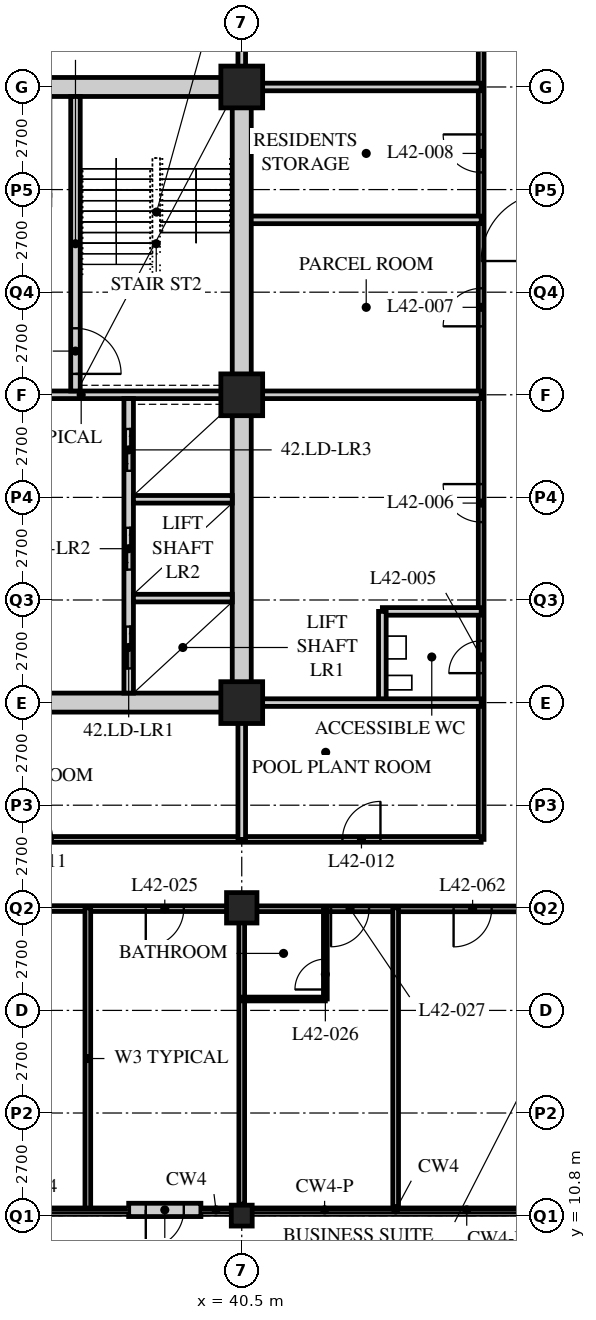
"""IFC4 building model, lengths in metres.
Left out: names, types, materials, properties, quantities, classifications, styles, units other than length and angle.
Written with IfcOpenShell. Run it as: python <this file> out.ifc"""

import sys

from ifc_helpers import new_model, si_unit, direction, frame, frame_2d, origin, origin_2d, place, context, subcontext, project, spatial, rectangle, hollow_rectangle, extrude, element, fill, save


model = new_model("IFC4")
c1 = context("Model", 3, precision=1e-05, world=origin(), true_north=direction((0.0, 1.0)))
c2 = subcontext(c1, "Body", "Model", "MODEL_VIEW")
j1 = project(units=[si_unit("LENGTHUNIT", "METRE"), si_unit("PLANEANGLEUNIT", "RADIAN")], contexts=[c1])
p1 = place(None, origin())
s1 = spatial("IfcSite", under=j1, at=p1, CompositionType="ELEMENT")
p2 = place(p1, origin())
s2 = spatial("IfcBuilding", under=s1, at=p2, CompositionType="ELEMENT")
p3 = place(p2, frame((0.0, 0.0, 165.0)))
s3 = spatial("IfcBuildingStorey", under=s2, at=p3, CompositionType="ELEMENT", Elevation=165.0)
p4 = place(p3, frame((40.5, 10.8, 0.0), z_axis=(0.0, 0.0, 1.0), x_axis=(1.0, 0.0, 0.0)))
e1 = element("IfcColumn", 1, at=p4, inside=s3, PredefinedType="COLUMN", context=c2, shape_type="SweptSolid", body=[
    extrude(hollow_rectangle(XDim=0.55, YDim=0.55, WallThickness=0.04, at=origin_2d()), origin(), (0.0, 0.0, 1.0), 5.4),
])
p5 = place(p3, frame((40.5, 18.9, 0.0), z_axis=(0.0, 0.0, 1.0), x_axis=(1.0, 0.0, 0.0)))
e2 = element("IfcColumn", 2, at=p5, inside=s3, PredefinedType="COLUMN", context=c2, shape_type="SweptSolid", body=[
    extrude(hollow_rectangle(XDim=0.8, YDim=0.8, WallThickness=0.08, at=origin_2d()), origin(), (0.0, 0.0, 1.0), 5.4),
])
for number, where, z_axis, x_axis in (
    (3, (40.5, 24.3, 0.0), (0.0, 0.0, 1.0), (1.0, 0.0, 0.0)),
    (4, (40.5, 32.4, 0.0), (0.0, 0.0, 1.0), (1.0, 0.0, 0.0)),
    (5, (40.5, 40.5, 0.0), (0.0, 0.0, 1.0), (1.0, 0.0, 0.0)),
):
    element("IfcColumn", number, at=place(p3, frame(where, z_axis=z_axis, x_axis=x_axis)), inside=s3, PredefinedType="COLUMN", context=c2, shape_type="SweptSolid", body=[
        extrude(hollow_rectangle(XDim=1.1, YDim=1.1, WallThickness=0.1, at=origin_2d()), origin(), (0.0, 0.0, 1.0), 5.4),
    ])
p6 = place(p3, frame((37.525, 10.95, 0.0), z_axis=(0.0, 0.0, 1.0), x_axis=(1.0, 0.0, 0.0)))
e6 = element("IfcWall", 6, at=p6, inside=s3, PredefinedType="SOLIDWALL", context=c2, shape_type="SweptSolid", body=[
    extrude(rectangle(XDim=1.9, YDim=0.35, at=frame_2d((0.95, 0.0))), origin(), (0.0, 0.0, 1.0), 4.42),
])
p7 = place(p6, frame((0.45, 0.0, 0.0)))
e7 = element("IfcOpeningElement", 7, at=p7, cuts=e6, PredefinedType="OPENING", context=c2, shape_type="SweptSolid", body=[
    extrude(rectangle(XDim=1.0, YDim=2.1, at=frame_2d((0.5, 1.05))), frame((0.0, 0.185, 0.0), z_axis=(0.0, -1.0, 0.0), x_axis=(1.0, 0.0, 0.0)), (0.0, 0.0, 1.0), 0.37),
])
p8 = place(p3, frame((8.1, 18.9, 0.0), z_axis=(0.0, 0.0, 1.0), x_axis=(0.999999729567, -0.000735435758, 0.0)))
e8 = element("IfcWall", 8, at=p8, inside=s3, PredefinedType="PARTITIONING", context=c2, shape_type="SweptSolid", body=[
    extrude(rectangle(XDim=40.5, YDim=0.15, at=frame_2d((20.25, 0.0))), origin(), (0.0, 0.0, 1.0), 4.42),
])
p9 = place(p8, frame((4.45, 0.0, 0.0)))
e9 = element("IfcOpeningElement", 9, at=p9, cuts=e8, PredefinedType="OPENING", context=c2, shape_type="SweptSolid", body=[
    extrude(rectangle(XDim=1.0, YDim=2.1, at=frame_2d((0.5, 1.05))), frame((0.0, 0.085, 0.0), z_axis=(0.0, -1.0, 0.0), x_axis=(1.0, 0.0, 0.0)), (0.0, 0.0, 1.0), 0.17),
])
p10 = place(p8, frame((25.15, 0.0, 0.0)))
e10 = element("IfcOpeningElement", 10, at=p10, cuts=e8, PredefinedType="OPENING", context=c2, shape_type="SweptSolid", body=[
    extrude(rectangle(XDim=1.8, YDim=2.4, at=frame_2d((0.9, 1.2))), frame((0.0, 0.085, 0.0), z_axis=(0.0, -1.0, 0.0), x_axis=(1.0, 0.0, 0.0)), (0.0, 0.0, 1.0), 0.17),
])
p11 = place(p8, frame((29.875, 0.0, 0.0)))
e11 = element("IfcOpeningElement", 11, at=p11, cuts=e8, PredefinedType="OPENING", context=c2, shape_type="SweptSolid", body=[
    extrude(rectangle(XDim=1.0, YDim=2.1, at=frame_2d((0.5, 1.05))), frame((0.0, 0.085, 0.0), z_axis=(0.0, -1.0, 0.0), x_axis=(1.0, 0.0, 0.0)), (0.0, 0.0, 1.0), 0.17),
])
p12 = place(p8, frame((34.75, 0.0, 0.0)))
e12 = element("IfcOpeningElement", 12, at=p12, cuts=e8, PredefinedType="OPENING", context=c2, shape_type="SweptSolid", body=[
    extrude(rectangle(XDim=1.0, YDim=2.1, at=frame_2d((0.5, 1.05))), frame((0.0, 0.085, 0.0), z_axis=(0.0, -1.0, 0.0), x_axis=(1.0, 0.0, 0.0)), (0.0, 0.0, 1.0), 0.17),
])
p13 = place(p8, frame((1.525, 0.0, 0.0)))
e13 = element("IfcOpeningElement", 13, at=p13, cuts=e8, PredefinedType="OPENING", context=c2, shape_type="SweptSolid", body=[
    extrude(rectangle(XDim=1.0, YDim=2.1, at=frame_2d((0.5, 1.05))), frame((0.0, 0.085, 0.0), z_axis=(0.0, -1.0, 0.0), x_axis=(1.0, 0.0, 0.0)), (0.0, 0.0, 1.0), 0.17),
])
p14 = place(p8, frame((37.975, 0.0, 0.0)))
e14 = element("IfcOpeningElement", 14, at=p14, cuts=e8, PredefinedType="OPENING", context=c2, shape_type="SweptSolid", body=[
    extrude(rectangle(XDim=1.0, YDim=2.1, at=frame_2d((0.5, 1.05))), frame((0.0, 0.085, 0.0), z_axis=(0.0, -1.0, 0.0), x_axis=(1.0, 0.0, 0.0)), (0.0, 0.0, 1.0), 0.17),
])
p15 = place(p3, frame((46.8, 20.7, 0.0), z_axis=(0.0, 0.0, 1.0), x_axis=(0.0, 1.0, 0.0)))
e15 = element("IfcWall", 15, at=p15, inside=s3, PredefinedType="PARTITIONING", context=c2, shape_type="SweptSolid", body=[
    extrude(rectangle(XDim=28.8, YDim=0.15, at=frame_2d((14.4, 0.0))), origin(), (0.0, 0.0, 1.0), 5.19),
])
p16 = place(p15, frame((4.375, 0.0, 0.0)))
e16 = element("IfcOpeningElement", 16, at=p16, cuts=e15, PredefinedType="OPENING", context=c2, shape_type="SweptSolid", body=[
    extrude(rectangle(XDim=0.85, YDim=2.1, at=frame_2d((0.425, 1.05))), frame((0.0, 0.085, 0.0), z_axis=(0.0, -1.0, 0.0), x_axis=(1.0, 0.0, 0.0)), (0.0, 0.0, 1.0), 0.17),
])
p17 = place(p15, frame((8.35, 0.0, 0.0)))
e17 = element("IfcOpeningElement", 17, at=p17, cuts=e15, PredefinedType="OPENING", context=c2, shape_type="SweptSolid", body=[
    extrude(rectangle(XDim=1.0, YDim=2.1, at=frame_2d((0.5, 1.05))), frame((0.0, 0.085, 0.0), z_axis=(0.0, -1.0, 0.0), x_axis=(1.0, 0.0, 0.0)), (0.0, 0.0, 1.0), 0.17),
])
p18 = place(p15, frame((13.502, 0.0, 0.0)))
e18 = element("IfcOpeningElement", 18, at=p18, cuts=e15, PredefinedType="OPENING", context=c2, shape_type="SweptSolid", body=[
    extrude(rectangle(XDim=1.0, YDim=2.1, at=frame_2d((0.5, 1.05))), frame((0.0, 0.085, 0.0), z_axis=(0.0, -1.0, 0.0), x_axis=(1.0, 0.0, 0.0)), (0.0, 0.0, 1.0), 0.17),
])
p19 = place(p15, frame((17.552, 0.0, 0.0)))
e19 = element("IfcOpeningElement", 19, at=p19, cuts=e15, PredefinedType="OPENING", context=c2, shape_type="SweptSolid", body=[
    extrude(rectangle(XDim=1.0, YDim=2.1, at=frame_2d((0.5, 1.05))), frame((0.0, 0.085, 0.0), z_axis=(0.0, -1.0, 0.0), x_axis=(1.0, 0.0, 0.0)), (0.0, 0.0, 1.0), 0.17),
])
p20 = place(p3, frame((29.56, 20.7, 0.0), z_axis=(0.0, 0.0, 1.0), x_axis=(1.0, 0.0, 0.0)))
e20 = element("IfcWall", 20, at=p20, inside=s3, PredefinedType="PARTITIONING", context=c2, shape_type="SweptSolid", body=[
    extrude(rectangle(XDim=17.24, YDim=0.15, at=frame_2d((8.62, 0.0))), origin(), (0.0, 0.0, 1.0), 5.19),
])
p21 = place(p20, frame((4.965, 0.0, 0.0)))
e21 = element("IfcOpeningElement", 21, at=p21, cuts=e20, PredefinedType="OPENING", context=c2, shape_type="SweptSolid", body=[
    extrude(rectangle(XDim=1.0, YDim=2.1, at=frame_2d((0.5, 1.05))), frame((0.0, 0.085, 0.0), z_axis=(0.0, -1.0, 0.0), x_axis=(1.0, 0.0, 0.0)), (0.0, 0.0, 1.0), 0.17),
])
p22 = place(p20, frame((13.59, 0.0, 0.0)))
e22 = element("IfcOpeningElement", 22, at=p22, cuts=e20, PredefinedType="OPENING", context=c2, shape_type="SweptSolid", body=[
    extrude(rectangle(XDim=1.0, YDim=2.1, at=frame_2d((0.5, 1.05))), frame((0.0, 0.085, 0.0), z_axis=(0.0, -1.0, 0.0), x_axis=(1.0, 0.0, 0.0)), (0.0, 0.0, 1.0), 0.17),
])
p23 = place(p3, frame((40.5, 32.4, 0.0), z_axis=(0.0, 0.0, 1.0), x_axis=(1.0, 0.0, 0.0)))
e23 = element("IfcWall", 23, at=p23, inside=s3, PredefinedType="SOLIDWALL", context=c2, shape_type="SweptSolid", body=[
    extrude(rectangle(XDim=6.3, YDim=0.2, at=frame_2d((3.15, 0.0))), origin(), (0.0, 0.0, 1.0), 5.19),
])
p24 = place(p3, frame((46.8, 26.7, 0.0), z_axis=(0.0, 0.0, 1.0), x_axis=(-1.0, 0.0, 0.0)))
e24 = element("IfcWall", 24, at=p24, inside=s3, PredefinedType="SOLIDWALL", context=c2, shape_type="SweptSolid", body=[
    extrude(rectangle(XDim=2.6, YDim=0.2, at=frame_2d((1.3, 0.0))), origin(), (0.0, 0.0, 1.0), 5.19),
])
p25 = place(p3, frame((44.2, 24.3, 0.0), z_axis=(0.0, 0.0, 1.0), x_axis=(0.0, 1.0, 0.0)))
e25 = element("IfcWall", 25, at=p25, inside=s3, PredefinedType="SOLIDWALL", context=c2, shape_type="SweptSolid", body=[
    extrude(rectangle(XDim=2.4, YDim=0.2, at=frame_2d((1.2, 0.0))), origin(), (0.0, 0.0, 1.0), 5.19),
])
p26 = place(p3, frame((46.8, 37.003, 0.0), z_axis=(0.0, 0.0, 1.0), x_axis=(-1.0, 0.0, 0.0)))
e26 = element("IfcWall", 26, at=p26, inside=s3, PredefinedType="SOLIDWALL", context=c2, shape_type="SweptSolid", body=[
    extrude(rectangle(XDim=6.3, YDim=0.2, at=frame_2d((3.15, 0.0))), origin(), (0.0, 0.0, 1.0), 5.19),
])
p27 = place(p3, frame((40.5, 20.7, 0.0), z_axis=(0.0, 0.0, 1.0), x_axis=(0.0, 1.0, 0.0)))
e27 = element("IfcWall", 27, at=p27, inside=s3, PredefinedType="SOLIDWALL", context=c2, shape_type="SweptSolid", body=[
    extrude(rectangle(XDim=3.6, YDim=0.2, at=frame_2d((1.8, 0.0))), origin(), (0.0, 0.0, 1.0), 4.42),
])
p28 = place(p3, frame((40.5, 40.5, 0.0), z_axis=(0.0, 0.0, 1.0), x_axis=(0.0, 1.0, 0.0)))
e28 = element("IfcWall", 28, at=p28, inside=s3, PredefinedType="SOLIDWALL", context=c2, shape_type="SweptSolid", body=[
    extrude(rectangle(XDim=9.0, YDim=0.2, at=frame_2d((4.5, 0.0))), origin(), (0.0, 0.0, 1.0), 4.42),
])
for number, where, z_axis, x_axis in (
    (29, (40.5, 24.3, 0.0), (0.0, 0.0, 1.0), (1.0, 0.0, 0.0)),
    (30, (40.5, 40.5, 0.0), (0.0, 0.0, 1.0), (1.0, 0.0, 0.0)),
):
    element("IfcWall", number, at=place(p3, frame(where, z_axis=z_axis, x_axis=x_axis)), inside=s3, PredefinedType="SOLIDWALL", context=c2, shape_type="SweptSolid", body=[
        extrude(rectangle(XDim=6.3, YDim=0.2, at=frame_2d((3.15, 0.0))), origin(), (0.0, 0.0, 1.0), 5.19),
    ])
p29 = place(p3, frame((36.45, 18.9, 0.0), z_axis=(0.0, 0.0, 1.0), x_axis=(0.0, -1.0, 0.0)))
e31 = element("IfcWall", 31, at=p29, inside=s3, PredefinedType="PARTITIONING", context=c2, shape_type="SweptSolid", body=[
    extrude(rectangle(XDim=7.933, YDim=0.15, at=frame_2d((3.966, 0.0))), origin(), (0.0, 0.0, 1.0), 5.19),
])
p30 = place(p3, frame((40.5, 18.9, 0.0), z_axis=(0.0, 0.0, 1.0), x_axis=(0.0, -1.0, 0.0)))
e32 = element("IfcWall", 32, at=p30, inside=s3, PredefinedType="PARTITIONING", context=c2, shape_type="SweptSolid", body=[
    extrude(rectangle(XDim=7.8, YDim=0.15, at=frame_2d((3.9, 0.0))), origin(), (0.0, 0.0, 1.0), 4.42),
])
p31 = place(p3, frame((40.5, 16.5, 0.0), z_axis=(0.0, 0.0, 1.0), x_axis=(1.0, 0.0, 0.0)))
e33 = element("IfcWall", 33, at=p31, inside=s3, PredefinedType="PARTITIONING", context=c2, shape_type="SweptSolid", body=[
    extrude(rectangle(XDim=2.2, YDim=0.1, at=frame_2d((1.1, 0.0))), origin(), (0.0, 0.0, 1.0), 5.19),
])
p32 = place(p3, frame((42.7, 18.9, 0.0), z_axis=(0.0, 0.0, 1.0), x_axis=(0.0, -1.0, 0.0)))
e34 = element("IfcWall", 34, at=p32, inside=s3, PredefinedType="PARTITIONING", context=c2, shape_type="SweptSolid", body=[
    extrude(rectangle(XDim=2.4, YDim=0.1, at=frame_2d((1.2, 0.0))), origin(), (0.0, 0.0, 1.0), 5.19),
])
p33 = place(p32, frame((1.35, 0.0, 0.0)))
e35 = element("IfcOpeningElement", 35, at=p33, cuts=e34, PredefinedType="OPENING", context=c2, shape_type="SweptSolid", body=[
    extrude(rectangle(XDim=0.8, YDim=2.1, at=frame_2d((0.4, 1.05))), frame((0.0, 0.06, 0.0), z_axis=(0.0, -1.0, 0.0), x_axis=(1.0, 0.0, 0.0)), (0.0, 0.0, 1.0), 0.12),
])
p34 = place(p3, frame((44.55, 18.9, 0.0), z_axis=(0.0, 0.0, 1.0), x_axis=(0.0, -1.0, 0.0)))
e36 = element("IfcWall", 36, at=p34, inside=s3, PredefinedType="PARTITIONING", context=c2, shape_type="SweptSolid", body=[
    extrude(rectangle(XDim=7.865, YDim=0.15, at=frame_2d((3.932, 0.0))), origin(), (0.0, 0.0, 1.0), 5.19),
])
p35 = place(p3, frame((15.95, 24.3, 0.0), z_axis=(0.0, 0.0, 1.0), x_axis=(1.0, 0.0, 0.0)))
e37 = element("IfcWall", 37, at=p35, inside=s3, PredefinedType="SOLIDWALL", context=c2, shape_type="SweptSolid", body=[
    extrude(rectangle(XDim=24.8, YDim=0.5, at=frame_2d((12.4, 0.0))), origin(), (0.0, 0.0, 1.0), 4.42),
])
p36 = place(p35, frame((11.5, 0.0, 0.0)))
e38 = element("IfcOpeningElement", 38, at=p36, cuts=e37, PredefinedType="OPENING", context=c2, shape_type="SweptSolid", body=[
    extrude(rectangle(XDim=1.8, YDim=2.4, at=frame_2d((0.9, 1.2))), frame((0.0, 0.26, 0.0), z_axis=(0.0, -1.0, 0.0), x_axis=(1.0, 0.0, 0.0)), (0.0, 0.0, 1.0), 0.52),
])
p37 = place(p3, frame((15.95, 40.5, 0.0), z_axis=(0.0, 0.0, 1.0), x_axis=(1.0, 0.0, 0.0)))
e39 = element("IfcWall", 39, at=p37, inside=s3, PredefinedType="SOLIDWALL", context=c2, shape_type="SweptSolid", body=[
    extrude(rectangle(XDim=24.8, YDim=0.5, at=frame_2d((12.4, 0.0))), origin(), (0.0, 0.0, 1.0), 4.42),
])
p38 = place(p37, frame((11.5, 0.0, 0.0)))
e40 = element("IfcOpeningElement", 40, at=p38, cuts=e39, PredefinedType="OPENING", context=c2, shape_type="SweptSolid", body=[
    extrude(rectangle(XDim=1.8, YDim=2.4, at=frame_2d((0.9, 1.2))), frame((0.0, 0.26, 0.0), z_axis=(0.0, -1.0, 0.0), x_axis=(1.0, 0.0, 0.0)), (0.0, 0.0, 1.0), 0.52),
])
p39 = place(p3, frame((40.5, 24.55, 0.0), z_axis=(0.0, 0.0, 1.0), x_axis=(0.0, 1.0, 0.0)))
e41 = element("IfcWall", 41, at=p39, inside=s3, PredefinedType="SOLIDWALL", context=c2, shape_type="SweptSolid", body=[
    extrude(rectangle(XDim=15.7, YDim=0.5, at=frame_2d((7.85, 0.0))), origin(), (0.0, 0.0, 1.0), 4.42),
])
p40 = place(p3, frame((32.3, 32.4, 0.0), z_axis=(0.0, 0.0, 1.0), x_axis=(1.0, 0.0, 0.0)))
e42 = element("IfcWall", 42, at=p40, inside=s3, PredefinedType="SOLIDWALL", context=c2, shape_type="SweptSolid", body=[
    extrude(rectangle(XDim=7.95, YDim=0.2, at=frame_2d((3.975, 0.0))), origin(), (0.0, 0.0, 1.0), 4.578),
])
p41 = place(p3, frame((37.525, 24.55, 0.0), z_axis=(0.0, 0.0, 1.0), x_axis=(0.0, 1.0, 0.0)))
e43 = element("IfcWall", 43, at=p41, inside=s3, PredefinedType="SOLIDWALL", context=c2, shape_type="SweptSolid", body=[
    extrude(rectangle(XDim=7.75, YDim=0.25, at=frame_2d((3.875, 0.0))), origin(), (0.0, 0.0, 1.0), 5.19),
])
p42 = place(p41, frame((0.65, 0.0, 0.0)))
e44 = element("IfcOpeningElement", 44, at=p42, cuts=e43, PredefinedType="OPENING", context=c2, shape_type="SweptSolid", body=[
    extrude(rectangle(XDim=1.1, YDim=2.4, at=frame_2d((0.55, 1.2))), frame((0.0, 0.135, 0.0), z_axis=(0.0, -1.0, 0.0), x_axis=(1.0, 0.0, 0.0)), (0.0, 0.0, 1.0), 0.27),
])
p43 = place(p41, frame((3.25, 0.0, 0.0)))
e45 = element("IfcOpeningElement", 45, at=p43, cuts=e43, PredefinedType="OPENING", context=c2, shape_type="SweptSolid", body=[
    extrude(rectangle(XDim=1.1, YDim=2.4, at=frame_2d((0.55, 1.2))), frame((0.0, 0.135, 0.0), z_axis=(0.0, -1.0, 0.0), x_axis=(1.0, 0.0, 0.0)), (0.0, 0.0, 1.0), 0.27),
])
p44 = place(p41, frame((5.85, 0.0, 0.0)))
e46 = element("IfcOpeningElement", 46, at=p44, cuts=e43, PredefinedType="OPENING", context=c2, shape_type="SweptSolid", body=[
    extrude(rectangle(XDim=1.1, YDim=2.4, at=frame_2d((0.55, 1.2))), frame((0.0, 0.135, 0.0), z_axis=(0.0, -1.0, 0.0), x_axis=(1.0, 0.0, 0.0)), (0.0, 0.0, 1.0), 0.27),
])
for number, where, z_axis, x_axis in (
    (47, (37.65, 27.05, 0.0), (0.0, 0.0, 1.0), (1.0, 0.0, 0.0)),
    (48, (37.65, 29.65, 0.0), (0.0, 0.0, 1.0), (1.0, 0.0, 0.0)),
):
    element("IfcWall", number, at=place(p3, frame(where, z_axis=z_axis, x_axis=x_axis)), inside=s3, PredefinedType="SOLIDWALL", context=c2, shape_type="SweptSolid", body=[
        extrude(rectangle(XDim=2.6, YDim=0.2, at=frame_2d((1.3, 0.0))), origin(), (0.0, 0.0, 1.0), 5.19),
    ])
p45 = place(p3, frame((36.125, 32.5, 0.0), z_axis=(0.0, 0.0, 1.0), x_axis=(0.0, 1.0, 0.0)))
e49 = element("IfcWall", 49, at=p45, inside=s3, PredefinedType="SOLIDWALL", context=c2, shape_type="SweptSolid", body=[
    extrude(rectangle(XDim=7.75, YDim=0.25, at=frame_2d((3.875, 0.0))), origin(), (0.0, 0.0, 1.0), 5.19),
])
p46 = place(p45, frame((0.45, 0.0, 0.0)))
e50 = element("IfcOpeningElement", 50, at=p46, cuts=e49, PredefinedType="OPENING", context=c2, shape_type="SweptSolid", body=[
    extrude(rectangle(XDim=1.2, YDim=2.1, at=frame_2d((0.6, 1.05))), frame((0.0, 0.135, 0.0), z_axis=(0.0, -1.0, 0.0), x_axis=(1.0, 0.0, 0.0)), (0.0, 0.0, 1.0), 0.27),
])
p47 = place(p7, origin())
e51 = element("IfcDoor", 51, at=p47, inside=s3, OperationType="SINGLE_SWING_RIGHT", PredefinedType="DOOR", context=c2, shape_type="SweptSolid", body=[
    extrude(rectangle(XDim=1.0, YDim=2.1, at=frame_2d((0.5, 1.05))), frame((0.0, 0.025, 0.0), z_axis=(0.0, -1.0, 0.0), x_axis=(1.0, 0.0, 0.0)), (0.0, 0.0, 1.0), 0.05),
])
fill(e7, e51)
p48 = place(p16, origin())
e52 = element("IfcDoor", 52, at=p48, inside=s3, OperationType="SINGLE_SWING_LEFT", PredefinedType="DOOR", context=c2, shape_type="SweptSolid", body=[
    extrude(rectangle(XDim=0.85, YDim=2.1, at=frame_2d((0.425, 1.05))), frame((0.0, 0.025, 0.0), z_axis=(0.0, -1.0, 0.0), x_axis=(1.0, 0.0, 0.0)), (0.0, 0.0, 1.0), 0.05),
])
fill(e16, e52)
p49 = place(p17, origin())
e53 = element("IfcDoor", 53, at=p49, inside=s3, OperationType="SINGLE_SWING_RIGHT", PredefinedType="DOOR", context=c2, shape_type="SweptSolid", body=[
    extrude(rectangle(XDim=1.0, YDim=2.1, at=frame_2d((0.5, 1.05))), frame((0.0, 0.025, 0.0), z_axis=(0.0, -1.0, 0.0), x_axis=(1.0, 0.0, 0.0)), (0.0, 0.0, 1.0), 0.05),
])
fill(e17, e53)
p50 = place(p18, origin())
e54 = element("IfcDoor", 54, at=p50, inside=s3, OperationType="SINGLE_SWING_LEFT", PredefinedType="DOOR", context=c2, shape_type="SweptSolid", body=[
    extrude(rectangle(XDim=1.0, YDim=2.1, at=frame_2d((0.5, 1.05))), frame((0.0, 0.025, 0.0), z_axis=(0.0, -1.0, 0.0), x_axis=(1.0, 0.0, 0.0)), (0.0, 0.0, 1.0), 0.05),
])
fill(e18, e54)
p51 = place(p19, origin())
e55 = element("IfcDoor", 55, at=p51, inside=s3, OperationType="SINGLE_SWING_RIGHT", PredefinedType="DOOR", context=c2, shape_type="SweptSolid", body=[
    extrude(rectangle(XDim=1.0, YDim=2.1, at=frame_2d((0.5, 1.05))), frame((0.0, 0.025, 0.0), z_axis=(0.0, -1.0, 0.0), x_axis=(1.0, 0.0, 0.0)), (0.0, 0.0, 1.0), 0.05),
])
fill(e19, e55)
p52 = place(p21, origin())
e56 = element("IfcDoor", 56, at=p52, inside=s3, OperationType="SINGLE_SWING_LEFT", PredefinedType="DOOR", context=c2, shape_type="SweptSolid", body=[
    extrude(rectangle(XDim=1.0, YDim=2.1, at=frame_2d((0.5, 1.05))), frame((0.0, 0.025, 0.0), z_axis=(0.0, -1.0, 0.0), x_axis=(1.0, 0.0, 0.0)), (0.0, 0.0, 1.0), 0.05),
])
fill(e21, e56)
p53 = place(p22, origin())
e57 = element("IfcDoor", 57, at=p53, inside=s3, OperationType="SINGLE_SWING_RIGHT", PredefinedType="DOOR", context=c2, shape_type="SweptSolid", body=[
    extrude(rectangle(XDim=1.0, YDim=2.1, at=frame_2d((0.5, 1.05))), frame((0.0, 0.025, 0.0), z_axis=(0.0, -1.0, 0.0), x_axis=(1.0, 0.0, 0.0)), (0.0, 0.0, 1.0), 0.05),
])
fill(e22, e57)
p54 = place(p11, origin())
e58 = element("IfcDoor", 58, at=p54, inside=s3, OperationType="SINGLE_SWING_RIGHT", PredefinedType="DOOR", context=c2, shape_type="SweptSolid", body=[
    extrude(rectangle(XDim=1.0, YDim=2.1, at=frame_2d((0.5, 1.05))), frame((0.0, 0.025, 0.0), z_axis=(0.0, -1.0, 0.0), x_axis=(1.0, 0.0, 0.0)), (0.0, 0.0, 1.0), 0.05),
])
fill(e11, e58)
p55 = place(p33, origin())
e59 = element("IfcDoor", 59, at=p55, inside=s3, OperationType="SINGLE_SWING_LEFT", PredefinedType="DOOR", context=c2, shape_type="SweptSolid", body=[
    extrude(rectangle(XDim=0.8, YDim=2.1, at=frame_2d((0.4, 1.05))), frame((0.0, 0.025, 0.0), z_axis=(0.0, -1.0, 0.0), x_axis=(1.0, 0.0, 0.0)), (0.0, 0.0, 1.0), 0.05),
])
fill(e35, e59)
p56 = place(p12, origin())
e60 = element("IfcDoor", 60, at=p56, inside=s3, OperationType="SINGLE_SWING_RIGHT", PredefinedType="DOOR", context=c2, shape_type="SweptSolid", body=[
    extrude(rectangle(XDim=1.0, YDim=2.1, at=frame_2d((0.5, 1.05))), frame((0.0, 0.025, 0.0), z_axis=(0.0, -1.0, 0.0), x_axis=(1.0, 0.0, 0.0)), (0.0, 0.0, 1.0), 0.05),
])
fill(e12, e60)
p57 = place(p14, origin())
e61 = element("IfcDoor", 61, at=p57, inside=s3, OperationType="SINGLE_SWING_RIGHT", PredefinedType="DOOR", context=c2, shape_type="SweptSolid", body=[
    extrude(rectangle(XDim=1.0, YDim=2.1, at=frame_2d((0.5, 1.05))), frame((0.0, 0.025, 0.0), z_axis=(0.0, -1.0, 0.0), x_axis=(1.0, 0.0, 0.0)), (0.0, 0.0, 1.0), 0.05),
])
fill(e14, e61)
p58 = place(p46, origin())
e62 = element("IfcDoor", 62, at=p58, inside=s3, OperationType="SINGLE_SWING_RIGHT", PredefinedType="DOOR", context=c2, shape_type="SweptSolid", body=[
    extrude(rectangle(XDim=1.2, YDim=2.1, at=frame_2d((0.6, 1.05))), frame((0.0, 0.025, 0.0), z_axis=(0.0, -1.0, 0.0), x_axis=(1.0, 0.0, 0.0)), (0.0, 0.0, 1.0), 0.05),
])
fill(e50, e62)
p59 = place(p42, origin())
e63 = element("IfcDoor", 63, at=p59, inside=s3, OperationType="DOUBLE_DOOR_SLIDING", PredefinedType="DOOR", context=c2, shape_type="SweptSolid", body=[
    extrude(rectangle(XDim=1.1, YDim=2.4, at=frame_2d((0.55, 1.2))), frame((0.0, 0.025, 0.0), z_axis=(0.0, -1.0, 0.0), x_axis=(1.0, 0.0, 0.0)), (0.0, 0.0, 1.0), 0.05),
])
fill(e44, e63)
p60 = place(p43, origin())
e64 = element("IfcDoor", 64, at=p60, inside=s3, OperationType="DOUBLE_DOOR_SLIDING", PredefinedType="DOOR", context=c2, shape_type="SweptSolid", body=[
    extrude(rectangle(XDim=1.1, YDim=2.4, at=frame_2d((0.55, 1.2))), frame((0.0, 0.025, 0.0), z_axis=(0.0, -1.0, 0.0), x_axis=(1.0, 0.0, 0.0)), (0.0, 0.0, 1.0), 0.05),
])
fill(e45, e64)
p61 = place(p44, origin())
e65 = element("IfcDoor", 65, at=p61, inside=s3, OperationType="DOUBLE_DOOR_SLIDING", PredefinedType="DOOR", context=c2, shape_type="SweptSolid", body=[
    extrude(rectangle(XDim=1.1, YDim=2.4, at=frame_2d((0.55, 1.2))), frame((0.0, 0.025, 0.0), z_axis=(0.0, -1.0, 0.0), x_axis=(1.0, 0.0, 0.0)), (0.0, 0.0, 1.0), 0.05),
])
fill(e46, e65)
save(model, sys.argv[1])
